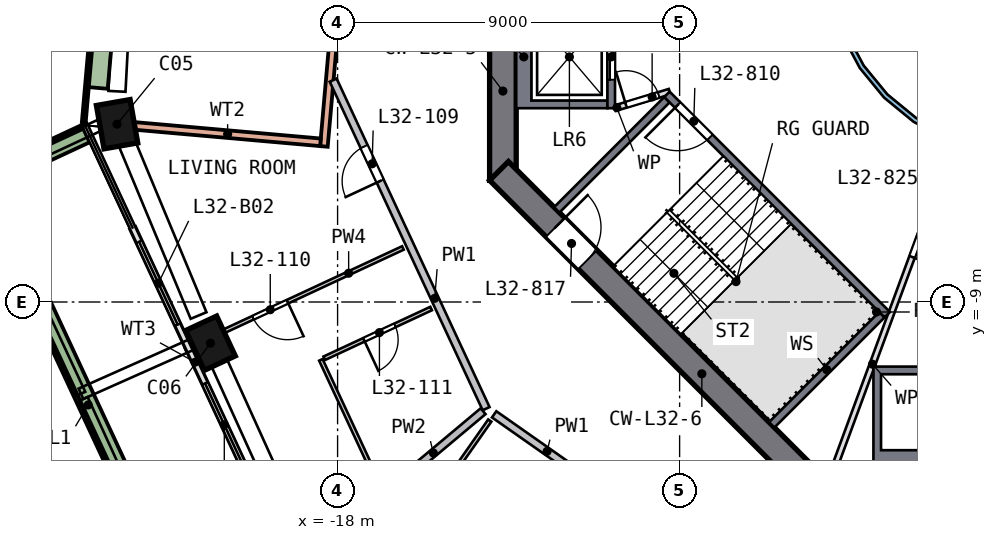
"""IFC4 building model, lengths in metres.
Left out: names, types, materials, properties, quantities, classifications, styles, units other than length and angle.
Written with IfcOpenShell. Run it as: python <this file> out.ifc"""

import sys

from ifc_helpers import new_model, si_unit, direction, frame, frame_2d, origin, origin_2d, place, context, subcontext, project, spatial, polyline, rectangle, outline, extrude, element, fill, save


model = new_model("IFC4")
c1 = context("Model", 3, precision=1e-05, world=origin(), true_north=direction((0.0, 1.0)))
c2 = subcontext(c1, "Body", "Model", "MODEL_VIEW")
j1 = project(units=[si_unit("LENGTHUNIT", "METRE"), si_unit("PLANEANGLEUNIT", "RADIAN")], contexts=[c1])
p1 = place(None, origin())
s1 = spatial("IfcSite", under=j1, at=p1, CompositionType="ELEMENT")
p2 = place(p1, origin())
s2 = spatial("IfcBuilding", under=s1, at=p2, CompositionType="ELEMENT")
p3 = place(p2, frame((0.0, 0.0, 136.5)))
s3 = spatial("IfcBuildingStorey", under=s2, at=p3, CompositionType="ELEMENT", Elevation=136.5)
p4 = place(p3, frame((-23.828, -4.184, 0.0), z_axis=(0.020907251, -0.113127235, 0.993360516), x_axis=(-0.172228343, 0.978316643, 0.115038876)))
e1 = element("IfcColumn", 1, at=p4, inside=s3, PredefinedType="COLUMN", context=c2, shape_type="SweptSolid", body=[
    extrude(rectangle(XDim=1.15, YDim=0.9, at=origin_2d()), origin(), (0.0, 0.0, 1.0), 3.211),
])
p5 = place(p3, frame((-21.403, -9.962, 0.0), z_axis=(0.048216176, -0.101375651, 0.993679112), x_axis=(0.419168471, -0.90094221, -0.112253848)))
e2 = element("IfcColumn", 2, at=p5, inside=s3, PredefinedType="COLUMN", context=c2, shape_type="SweptSolid", body=[
    extrude(rectangle(XDim=1.15, YDim=0.9, at=origin_2d()), origin(), (0.0, 0.0, 1.0), 3.21),
])
p6 = place(p3, frame((-13.65, 5.799, 0.0), z_axis=(0.0, 0.0, 1.0), x_axis=(0.0, -1.0, 0.0)))
e3 = element("IfcWall", 3, at=p6, inside=s3, PredefinedType="SHEAR", context=c2, shape_type="SweptSolid", body=[
    extrude(rectangle(XDim=11.598, YDim=0.7, at=frame_2d((5.799, 0.0))), origin(), (0.0, 0.0, 1.0), 3.5),
])
p7 = place(p6, frame((4.899, 0.0, 0.0)))
e4 = element("IfcOpeningElement", 4, at=p7, cuts=e3, PredefinedType="OPENING", context=c2, shape_type="SweptSolid", body=[
    extrude(rectangle(XDim=1.8, YDim=2.1, at=frame_2d((0.9, 1.05))), frame((0.0, 0.36, 0.0), z_axis=(0.0, -1.0, 0.0), x_axis=(1.0, 0.0, 0.0)), (0.0, 0.0, 1.0), 0.72),
])
p8 = place(p3, frame((-13.752, -5.552, 0.0), z_axis=(0.0, 0.0, 1.0), x_axis=(0.707106781, -0.707106781, 0.0)))
e5 = element("IfcWall", 5, at=p8, inside=s3, PredefinedType="SHEAR", context=c2, shape_type="SweptSolid", body=[
    extrude(rectangle(XDim=11.598, YDim=0.7, at=frame_2d((5.799, 0.0))), origin(), (0.0, 0.0, 1.0), 3.5),
])
p9 = place(p8, frame((2.099, 0.0, 0.0)))
e6 = element("IfcOpeningElement", 6, at=p9, cuts=e5, PredefinedType="OPENING", context=c2, shape_type="SweptSolid", body=[
    extrude(rectangle(XDim=1.2, YDim=2.1, at=frame_2d((0.6, 1.05))), frame((0.0, 0.36, 0.0), z_axis=(0.0, -1.0, 0.0), x_axis=(1.0, 0.0, 0.0)), (0.0, 0.0, 1.0), 0.72),
])
p10 = place(p3, frame((-23.391, -7.055, 0.0), z_axis=(0.0, 0.0, 1.0), x_axis=(0.422027589, -0.906582988, 0.0)))
e7 = element("IfcWall", 7, at=p10, inside=s3, PredefinedType="SOLIDWALL", context=c2, shape_type="SweptSolid", body=[
    extrude(rectangle(XDim=3.475, YDim=0.15, at=frame_2d((1.738, 0.0))), origin(), (0.0, 0.0, 1.0), 2.475),
])
p11 = place(p10, frame((0.4, 0.0, 0.0)))
e8 = element("IfcOpeningElement", 8, at=p11, cuts=e7, PredefinedType="OPENING", context=c2, shape_type="SweptSolid", body=[
    extrude(rectangle(XDim=2.4, YDim=2.4, at=frame_2d((1.2, 1.2))), frame((0.0, 0.085, 0.0), z_axis=(0.0, -1.0, 0.0), x_axis=(1.0, 0.0, 0.0)), (0.0, 0.0, 1.0), 0.17),
])
p12 = place(p3, frame((-21.925, -10.205, 0.0), z_axis=(0.0, 0.0, 1.0), x_axis=(0.421958321, -0.90661523, 0.0)))
e9 = element("IfcWall", 9, at=p12, inside=s3, PredefinedType="SOLIDWALL", context=c2, shape_type="SweptSolid", body=[
    extrude(rectangle(XDim=3.835, YDim=0.15, at=frame_2d((1.918, 0.0))), origin(), (0.0, 0.0, 1.0), 2.475),
])
p13 = place(p12, frame((1.035, 0.0, 0.0)))
e10 = element("IfcOpeningElement", 10, at=p13, cuts=e9, PredefinedType="OPENING", context=c2, shape_type="SweptSolid", body=[
    extrude(rectangle(XDim=2.4, YDim=2.4, at=frame_2d((1.2, 1.2))), frame((0.0, 0.085, 0.0), z_axis=(0.0, -1.0, 0.0), x_axis=(1.0, 0.0, 0.0)), (0.0, 0.0, 1.0), 0.17),
])
p14 = place(p3, frame((-24.631, -4.571, 0.0), z_axis=(0.0, 0.0, 1.0), x_axis=(-0.906621324, -0.421945227, 0.0)))
e11 = element("IfcWall", 11, at=p14, inside=s3, PredefinedType="SOLIDWALL", context=c2, shape_type="SweptSolid", body=[
    extrude(rectangle(XDim=3.199, YDim=0.5, at=frame_2d((1.6, 0.0))), origin(), (0.0, 0.0, 1.0), 0.7),
])
p15 = place(p3, frame((-27.199, -6.042, 0.0), z_axis=(0.0, 0.0, 1.0), x_axis=(0.421975332, -0.906607312, 0.0)))
e12 = element("IfcWall", 12, at=p15, inside=s3, PredefinedType="SOLIDWALL", context=c2, shape_type="SweptSolid", body=[
    extrude(rectangle(XDim=12.5, YDim=0.5, at=frame_2d((6.25, 0.0))), origin(), (0.0, 0.0, 1.0), 0.7),
])
p16 = place(p3, frame((-18.36, -4.906, 0.0), z_axis=(0.0, 0.0, 1.0), x_axis=(0.087853252, 0.996133428, 0.0)))
e13 = element("IfcWall", 13, at=p16, inside=s3, PredefinedType="SOLIDWALL", context=c2, shape_type="SweptSolid", body=[
    extrude(rectangle(XDim=13.0, YDim=0.2, at=frame_2d((6.5, 0.0))), origin(), (0.0, 0.0, 1.0), 3.19),
])
p17 = place(p16, frame((5.6, 0.0, 0.0)))
e14 = element("IfcOpeningElement", 14, at=p17, cuts=e13, PredefinedType="OPENING", context=c2, shape_type="SweptSolid", body=[
    extrude(rectangle(XDim=1.8, YDim=2.4, at=frame_2d((0.9, 1.2))), frame((0.0, 0.11, 0.0), z_axis=(0.0, -1.0, 0.0), x_axis=(1.0, 0.0, 0.0)), (0.0, 0.0, 1.0), 0.22),
])
p18 = place(p3, frame((-23.336, -4.367, 0.0), z_axis=(0.0, 0.0, 1.0), x_axis=(0.996131645, -0.087873468, 0.0)))
e15 = element("IfcWall", 15, at=p18, inside=s3, PredefinedType="SOLIDWALL", context=c2, shape_type="SweptSolid", body=[
    extrude(rectangle(XDim=4.904, YDim=0.2, at=frame_2d((2.452, 0.0))), origin(), (0.0, 0.0, 1.0), 3.19),
])
p19 = place(p3, frame((-23.551, 8.522, 0.0), z_axis=(0.0, 0.0, 1.0), x_axis=(-0.087843868, -0.996134255, 0.0)))
e16 = element("IfcWall", 16, at=p19, inside=s3, PredefinedType="SOLIDWALL", context=c2, shape_type="SweptSolid", body=[
    extrude(rectangle(XDim=12.84, YDim=0.1, at=frame_2d((6.42, 0.0))), origin(), (0.0, 0.0, 1.0), 0.7),
])
p20 = place(p3, frame((-23.907, 1.069, 0.0), z_axis=(0.0, 0.0, 1.0), x_axis=(-0.08780743, -0.996137468, 0.0)))
e17 = element("IfcWall", 17, at=p20, inside=s3, PredefinedType="SOLIDWALL", context=c2, shape_type="SweptSolid", body=[
    extrude(rectangle(XDim=4.454, YDim=0.5, at=frame_2d((2.227, 0.0))), origin(), (0.0, 0.0, 1.0), 0.7),
])
p21 = place(p3, origin())
e18 = element("IfcWall", 18, at=p21, inside=s3, PredefinedType="SOLIDWALL", context=c2, shape_type="SweptSolid", body=[
    extrude(outline(polyline([(-13.3, -3.9), (-13.3, -1.2), (-10.9, -1.2), (-10.9, -1.4), (-12.9, -1.4), (-12.9, -3.7), (-10.9, -3.7), (-10.9, -3.9), (-13.3, -3.9)])), origin(), (0.0, 0.0, 1.0), 3.19),
])
p22 = place(p3, frame((-10.8, -1.2, 0.0), z_axis=(0.0, 0.0, 1.0), x_axis=(0.0, -1.0, 0.0)))
e19 = element("IfcWall", 19, at=p22, inside=s3, PredefinedType="SOLIDWALL", context=c2, shape_type="SweptSolid", body=[
    extrude(rectangle(XDim=2.7, YDim=0.2, at=frame_2d((1.35, 0.0))), origin(), (0.0, 0.0, 1.0), 3.19),
])
p23 = place(p22, frame((0.75, 0.0, 0.0)))
e20 = element("IfcOpeningElement", 20, at=p23, cuts=e19, PredefinedType="OPENING", context=c2, shape_type="SweptSolid", body=[
    extrude(rectangle(XDim=1.2, YDim=2.1, at=frame_2d((0.6, 1.05))), frame((0.0, 0.11, 0.0), z_axis=(0.0, -1.0, 0.0), x_axis=(1.0, 0.0, 0.0)), (0.0, 0.0, 1.0), 0.22),
])
p24 = place(p3, origin())
e21 = element("IfcWall", 21, at=p24, inside=s3, PredefinedType="SOLIDWALL", context=c2, shape_type="SweptSolid", body=[
    extrude(outline(polyline([(-1.2, -13.3), (-3.9, -13.3), (-3.9, -10.7), (-1.2, -10.7), (-1.2, -13.3)]), holes=[polyline([(-3.7, -10.9), (-3.7, -12.9), (-1.4, -12.9), (-1.4, -10.9), (-3.7, -10.9)])]), origin(), (0.0, 0.0, 1.0), 3.19),
])
p25 = place(p3, frame((-3.535, -9.334, 0.0), z_axis=(0.0, 0.0, 1.0), x_axis=(-0.707106781, 0.707106781, 0.0)))
e22 = element("IfcWall", 22, at=p25, inside=s3, PredefinedType="SOLIDWALL", context=c2, shape_type="SweptSolid", body=[
    extrude(rectangle(XDim=8.2, YDim=0.2, at=frame_2d((4.1, 0.0))), origin(), (0.0, 0.0, 1.0), 3.19),
])
p26 = place(p25, frame((6.6, 0.0, 0.0)))
e23 = element("IfcOpeningElement", 23, at=p26, cuts=e22, PredefinedType="OPENING", context=c2, shape_type="SweptSolid", body=[
    extrude(rectangle(XDim=1.2, YDim=2.1, at=frame_2d((0.6, 1.05))), frame((0.0, 0.11, 0.0), z_axis=(0.0, -1.0, 0.0), x_axis=(1.0, 0.0, 0.0)), (0.0, 0.0, 1.0), 0.22),
])
for number, where, z_axis, x_axis in (
    (24, (-9.334, -3.677, 0.0), (0.0, 0.0, 1.0), (-0.707, -0.707, 0.0)),
    (25, (-3.677, -9.334, 0.0), (0.0, 0.0, 1.0), (-0.707, -0.707, 0.0)),
):
    element("IfcWall", number, at=place(p3, frame(where, z_axis=z_axis, x_axis=x_axis)), inside=s3, PredefinedType="SOLIDWALL", context=c2, shape_type="SweptSolid", body=[
        extrude(rectangle(XDim=4.1, YDim=0.2, at=frame_2d((2.05, 0.0))), origin(), (0.0, 0.0, 1.0), 3.19),
    ])
p27 = place(p3, frame((-10.7, -3.9, 0.0), z_axis=(0.0, 0.0, 1.0), x_axis=(0.957084567, 0.289808785, 0.0)))
e26 = element("IfcWall", 26, at=p27, inside=s3, PredefinedType="PARTITIONING", context=c2, shape_type="SweptSolid", body=[
    extrude(rectangle(XDim=1.501, YDim=0.15, at=frame_2d((0.75, 0.0))), origin(), (0.0, 0.0, 1.0), 3.19),
])
p28 = place(p27, frame((0.301, 0.0, 0.0)))
e27 = element("IfcOpeningElement", 27, at=p28, cuts=e26, PredefinedType="OPENING", context=c2, shape_type="SweptSolid", body=[
    extrude(rectangle(XDim=0.9, YDim=2.1, at=frame_2d((0.45, 1.05))), frame((0.0, 0.085, 0.0), z_axis=(0.0, -1.0, 0.0), x_axis=(1.0, 0.0, 0.0)), (0.0, 0.0, 1.0), 0.17),
])
p29 = place(p3, frame((-1.776, -4.813, 0.0), z_axis=(0.0, 0.0, 1.0), x_axis=(-0.346109381, -0.938194168, 0.0)))
e28 = element("IfcWall", 28, at=p29, inside=s3, PredefinedType="PARTITIONING", context=c2, shape_type="SweptSolid", body=[
    extrude(rectangle(XDim=9.016, YDim=0.15, at=frame_2d((4.508, 0.0))), origin(), (0.0, 0.0, 1.0), 3.19),
])
p30 = place(p29, frame((1.4, 0.0, 0.0)))
e29 = element("IfcOpeningElement", 29, at=p30, cuts=e28, PredefinedType="OPENING", context=c2, shape_type="SweptSolid", body=[
    extrude(rectangle(XDim=1.8, YDim=2.1, at=frame_2d((0.9, 1.05))), frame((0.0, 0.085, 0.0), z_axis=(0.0, -1.0, 0.0), x_axis=(1.0, 0.0, 0.0)), (0.0, 0.0, 1.0), 0.17),
])
p31 = place(p3, origin())
e30 = element("IfcWall", 30, at=p31, inside=s3, PredefinedType="SOLIDWALL", context=c2, shape_type="SweptSolid", body=[
    extrude(outline(polyline([(5.021, -0.999), (4.73, -1.959), (4.257, -2.844), (3.62, -3.62), (2.844, -4.257), (1.959, -4.73), (0.999, -5.021), (0.0, -5.12), (-0.999, -5.021), (-1.959, -4.73), (-2.844, -4.257), (-3.62, -3.62), (-4.257, -2.844), (-4.73, -1.959), (-5.021, -0.999), (-5.12, 0.0), (-5.021, 0.999), (-4.73, 1.959), (-4.257, 2.844), (-3.62, 3.62), (-2.844, 4.257), (-1.959, 4.73), (-0.999, 5.021), (0.0, 5.12), (0.999, 5.021), (1.959, 4.73), (2.844, 4.257), (3.62, 3.62), (4.257, 2.844), (4.73, 1.959), (5.021, 0.999), (5.12, 0.0), (5.021, -0.999)]), holes=[polyline([(4.904, 0.976), (4.619, 1.913), (4.157, 2.778), (3.535, 3.535), (2.778, 4.157), (1.913, 4.619), (0.976, 4.904), (0.0, 5.0), (-0.976, 4.904), (-1.913, 4.619), (-2.778, 4.157), (-3.535, 3.535), (-4.157, 2.778), (-4.619, 1.913), (-4.904, 0.976), (-5.0, 0.0), (-4.904, -0.976), (-4.619, -1.913), (-4.157, -2.778), (-3.535, -3.535), (-2.778, -4.157), (-1.913, -4.619), (-0.976, -4.904), (0.0, -5.0), (0.976, -4.904), (1.913, -4.619), (2.778, -4.157), (3.535, -3.535), (4.157, -2.778), (4.619, -1.913), (4.904, -0.976), (5.0, 0.0), (4.904, 0.976)])]), origin(), (0.0, 0.0, 1.0), 3.19),
])
p32 = place(p3, frame((-14.092, -11.808, 0.0), z_axis=(0.0, 0.0, 1.0), x_axis=(-0.421991127, 0.906599961, 0.0)))
e31 = element("IfcWall", 31, at=p32, inside=s3, PredefinedType="SOLIDWALL", context=c2, shape_type="SweptSolid", body=[
    extrude(rectangle(XDim=9.537, YDim=0.2, at=frame_2d((4.768, 0.0))), origin(), (0.0, 0.0, 1.0), 3.19),
])
p33 = place(p32, frame((6.608, 0.0, 0.0)))
e32 = element("IfcOpeningElement", 32, at=p33, cuts=e31, PredefinedType="OPENING", context=c2, shape_type="SweptSolid", body=[
    extrude(rectangle(XDim=1.0, YDim=2.1, at=frame_2d((0.5, 1.05))), frame((0.0, 0.11, 0.0), z_axis=(0.0, -1.0, 0.0), x_axis=(1.0, 0.0, 0.0)), (0.0, 0.0, 1.0), 0.22),
])
p34 = place(p3, frame((-13.88, -11.956, 0.0), z_axis=(0.0, 0.0, 1.0), x_axis=(0.818762763, -0.574131987, 0.0)))
e33 = element("IfcWall", 33, at=p34, inside=s3, PredefinedType="SOLIDWALL", context=c2, shape_type="SweptSolid", body=[
    extrude(rectangle(XDim=3.4, YDim=0.2, at=frame_2d((1.7, 0.0))), origin(), (0.0, 0.0, 1.0), 3.19),
])
p35 = place(p3, frame((-14.171, -11.874, 0.0), z_axis=(0.0, 0.0, 1.0), x_axis=(-0.766508121, -0.642234615, 0.0)))
e34 = element("IfcWall", 34, at=p35, inside=s3, PredefinedType="SOLIDWALL", context=c2, shape_type="SweptSolid", body=[
    extrude(rectangle(XDim=3.416, YDim=0.2, at=frame_2d((1.708, 0.0))), origin(), (0.0, 0.0, 1.0), 3.19),
])
p36 = place(p3, frame((-16.281, -7.578, 0.0), z_axis=(0.0, 0.0, 1.0), x_axis=(-0.90660458, -0.421981202, 0.0)))
e35 = element("IfcWall", 35, at=p36, inside=s3, PredefinedType="PARTITIONING", context=c2, shape_type="SweptSolid", body=[
    extrude(rectangle(XDim=6.15, YDim=0.1, at=frame_2d((3.075, 0.0))), origin(), (0.0, 0.0, 1.0), 3.19),
])
p37 = place(p36, frame((3.35, 0.0, 0.0)))
e36 = element("IfcOpeningElement", 36, at=p37, cuts=e35, PredefinedType="OPENING", context=c2, shape_type="SweptSolid", body=[
    extrude(rectangle(XDim=1.0, YDim=2.1, at=frame_2d((0.5, 1.05))), frame((0.0, 0.06, 0.0), z_axis=(0.0, -1.0, 0.0), x_axis=(1.0, 0.0, 0.0)), (0.0, 0.0, 1.0), 0.12),
])
p38 = place(p3, frame((-18.44, -10.523, 0.0), z_axis=(0.0, 0.0, 1.0), x_axis=(0.421990349, -0.906600323, 0.0)))
e37 = element("IfcWall", 37, at=p38, inside=s3, PredefinedType="PARTITIONING", context=c2, shape_type="SweptSolid", body=[
    extrude(rectangle(XDim=3.704, YDim=0.1, at=frame_2d((1.852, 0.0))), origin(), (0.0, 0.0, 1.0), 3.19),
])
p39 = place(p3, frame((-15.539, -9.172, 0.0), z_axis=(0.0, 0.0, 1.0), x_axis=(-0.906613229, -0.42196262, 0.0)))
e38 = element("IfcWall", 38, at=p39, inside=s3, PredefinedType="PARTITIONING", context=c2, shape_type="SweptSolid", body=[
    extrude(rectangle(XDim=3.1, YDim=0.1, at=frame_2d((1.55, 0.0))), origin(), (0.0, 0.0, 1.0), 3.19),
])
p40 = place(p39, frame((1.05, 0.0, 0.0)))
e39 = element("IfcOpeningElement", 39, at=p40, cuts=e38, PredefinedType="OPENING", context=c2, shape_type="SweptSolid", body=[
    extrude(rectangle(XDim=0.9, YDim=2.1, at=frame_2d((0.45, 1.05))), frame((0.0, 0.06, 0.0), z_axis=(0.0, -1.0, 0.0), x_axis=(1.0, 0.0, 0.0)), (0.0, 0.0, 1.0), 0.12),
])
p41 = place(p3, frame((-13.995, -12.12, 0.0), z_axis=(0.0, 0.0, 1.0), x_axis=(-0.57416, -0.818743118, 0.0)))
e40 = element("IfcWall", 40, at=p41, inside=s3, PredefinedType="PARTITIONING", context=c2, shape_type="SweptSolid", body=[
    extrude(rectangle(XDim=2.7, YDim=0.1, at=frame_2d((1.35, 0.0))), origin(), (0.0, 0.0, 1.0), 3.19),
])
p42 = place(p11, origin())
e41 = element("IfcDoor", 41, at=p42, inside=s3, OperationType="SLIDING_TO_RIGHT", PredefinedType="DOOR", context=c2, shape_type="SweptSolid", body=[
    extrude(rectangle(XDim=2.4, YDim=2.4, at=frame_2d((1.2, 1.2))), frame((0.0, 0.025, 0.0), z_axis=(0.0, -1.0, 0.0), x_axis=(1.0, 0.0, 0.0)), (0.0, 0.0, 1.0), 0.05),
])
fill(e8, e41)
p43 = place(p13, origin())
e42 = element("IfcDoor", 42, at=p43, inside=s3, OperationType="SLIDING_TO_LEFT", PredefinedType="DOOR", context=c2, shape_type="SweptSolid", body=[
    extrude(rectangle(XDim=2.4, YDim=2.4, at=frame_2d((1.2, 1.2))), frame((0.0, 0.025, 0.0), z_axis=(0.0, -1.0, 0.0), x_axis=(1.0, 0.0, 0.0)), (0.0, 0.0, 1.0), 0.05),
])
fill(e10, e42)
p44 = place(p23, origin())
e43 = element("IfcDoor", 43, at=p44, inside=s3, OperationType="DOUBLE_DOOR_SLIDING", PredefinedType="DOOR", context=c2, shape_type="SweptSolid", body=[
    extrude(rectangle(XDim=1.2, YDim=2.1, at=frame_2d((0.6, 1.05))), frame((0.0, 0.025, 0.0), z_axis=(0.0, -1.0, 0.0), x_axis=(1.0, 0.0, 0.0)), (0.0, 0.0, 1.0), 0.05),
])
fill(e20, e43)
p45 = place(p26, origin())
e44 = element("IfcDoor", 44, at=p45, inside=s3, OperationType="SINGLE_SWING_RIGHT", PredefinedType="DOOR", context=c2, shape_type="SweptSolid", body=[
    extrude(rectangle(XDim=1.2, YDim=2.1, at=frame_2d((0.6, 1.05))), frame((0.0, 0.025, 0.0), z_axis=(0.0, -1.0, 0.0), x_axis=(1.0, 0.0, 0.0)), (0.0, 0.0, 1.0), 0.05),
])
fill(e23, e44)
p46 = place(p9, origin())
e45 = element("IfcDoor", 45, at=p46, inside=s3, OperationType="SINGLE_SWING_LEFT", PredefinedType="DOOR", context=c2, shape_type="SweptSolid", body=[
    extrude(rectangle(XDim=1.2, YDim=2.1, at=frame_2d((0.6, 1.05))), frame((0.0, 0.025, 0.0), z_axis=(0.0, -1.0, 0.0), x_axis=(1.0, 0.0, 0.0)), (0.0, 0.0, 1.0), 0.05),
])
fill(e6, e45)
p47 = place(p28, origin())
e46 = element("IfcDoor", 46, at=p47, inside=s3, OperationType="SINGLE_SWING_LEFT", PredefinedType="DOOR", context=c2, shape_type="SweptSolid", body=[
    extrude(rectangle(XDim=0.9, YDim=2.1, at=frame_2d((0.45, 1.05))), frame((0.0, 0.025, 0.0), z_axis=(0.0, -1.0, 0.0), x_axis=(1.0, 0.0, 0.0)), (0.0, 0.0, 1.0), 0.05),
])
fill(e27, e46)
p48 = place(p30, origin())
e47 = element("IfcDoor", 47, at=p48, inside=s3, OperationType="DOUBLE_DOOR_SINGLE_SWING", PredefinedType="DOOR", context=c2, shape_type="SweptSolid", body=[
    extrude(rectangle(XDim=1.8, YDim=2.1, at=frame_2d((0.9, 1.05))), frame((0.0, 0.025, 0.0), z_axis=(0.0, -1.0, 0.0), x_axis=(1.0, 0.0, 0.0)), (0.0, 0.0, 1.0), 0.05),
])
fill(e29, e47)
p49 = place(p33, origin())
e48 = element("IfcDoor", 48, at=p49, inside=s3, OperationType="SINGLE_SWING_LEFT", PredefinedType="DOOR", context=c2, shape_type="SweptSolid", body=[
    extrude(rectangle(XDim=1.0, YDim=2.1, at=frame_2d((0.5, 1.05))), frame((0.0, 0.025, 0.0), z_axis=(0.0, -1.0, 0.0), x_axis=(1.0, 0.0, 0.0)), (0.0, 0.0, 1.0), 0.05),
])
fill(e32, e48)
p50 = place(p37, origin())
e49 = element("IfcDoor", 49, at=p50, inside=s3, OperationType="SINGLE_SWING_LEFT", PredefinedType="DOOR", context=c2, shape_type="SweptSolid", body=[
    extrude(rectangle(XDim=1.0, YDim=2.1, at=frame_2d((0.5, 1.05))), frame((0.0, 0.025, 0.0), z_axis=(0.0, -1.0, 0.0), x_axis=(1.0, 0.0, 0.0)), (0.0, 0.0, 1.0), 0.05),
])
fill(e36, e49)
p51 = place(p40, origin())
e50 = element("IfcDoor", 50, at=p51, inside=s3, OperationType="SINGLE_SWING_RIGHT", PredefinedType="DOOR", context=c2, shape_type="SweptSolid", body=[
    extrude(rectangle(XDim=0.9, YDim=2.1, at=frame_2d((0.45, 1.05))), frame((0.0, 0.025, 0.0), z_axis=(0.0, -1.0, 0.0), x_axis=(1.0, 0.0, 0.0)), (0.0, 0.0, 1.0), 0.05),
])
fill(e39, e50)
save(model, sys.argv[1])
